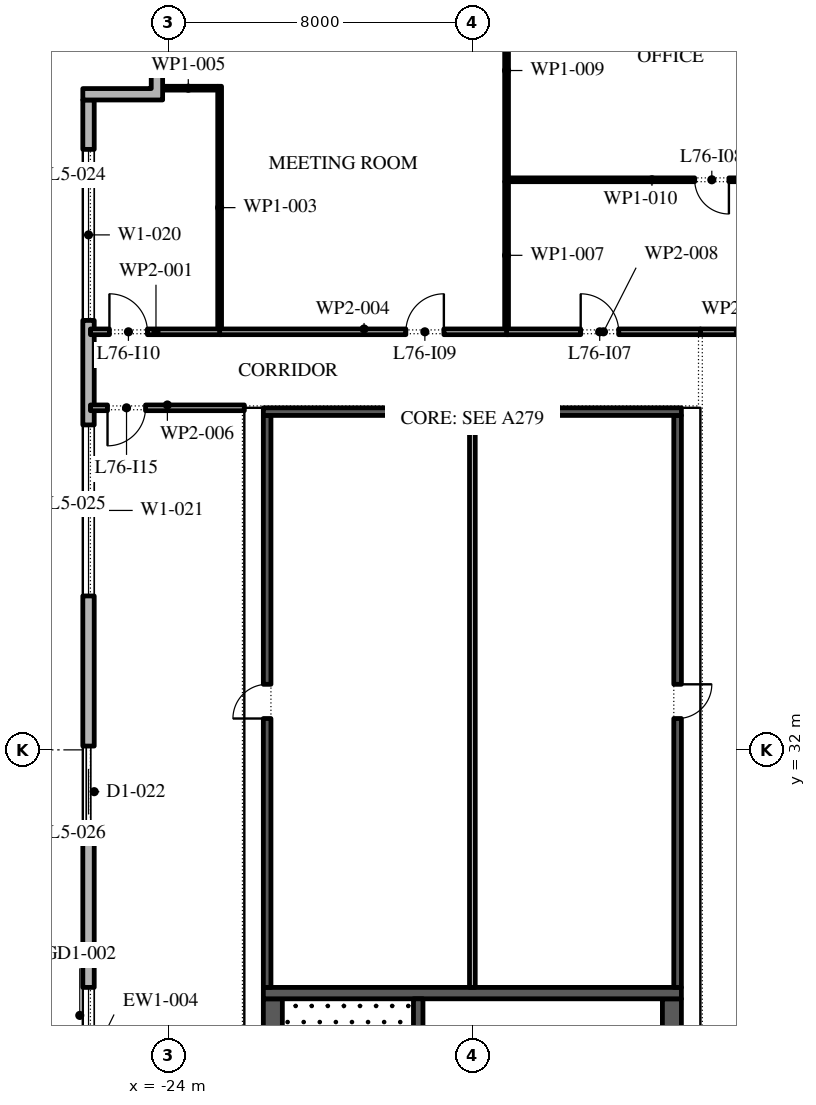
"""IFC4 building model, lengths in metres.
Left out: names, types, materials, properties, quantities, classifications, styles, units other than length and angle.
Written with IfcOpenShell. Run it as: python <this file> out.ifc"""

import sys

from ifc_helpers import new_model, si_unit, direction, frame, frame_2d, origin, place, context, subcontext, project, spatial, polyline, rectangle, outline, extrude, element, fill, save


model = new_model("IFC4")
c1 = context("Model", 3, precision=1e-05, world=origin(), true_north=direction((0.0, 1.0)))
c2 = subcontext(c1, "Body", "Model", "MODEL_VIEW")
j1 = project(units=[si_unit("LENGTHUNIT", "METRE"), si_unit("PLANEANGLEUNIT", "RADIAN")], contexts=[c1])
p1 = place(None, origin())
s1 = spatial("IfcSite", under=j1, at=p1, CompositionType="ELEMENT")
p2 = place(p1, origin())
s2 = spatial("IfcBuilding", under=s1, at=p2, CompositionType="ELEMENT")
p3 = place(p2, frame((0.0, 0.0, 346.8)))
s3 = spatial("IfcBuildingStorey", under=s2, at=p3, CompositionType="ELEMENT", Elevation=346.8)
p4 = place(p3, frame((-26.1, 49.1, 0.0), z_axis=(0.0, 0.0, 1.0), x_axis=(0.0, -1.0, 0.0)))
e1 = element("IfcWall", 1, at=p4, inside=s3, PredefinedType="STANDARD", context=c2, shape_type="SweptSolid", body=[
    extrude(rectangle(XDim=51.5, YDim=0.3, at=frame_2d((25.75, 0.0))), origin(), (0.0, 0.0, 1.0), 4.0),
])
p5 = place(p4, frame((1.3, 0.0, 0.45)))
e2 = element("IfcOpeningElement", 2, at=p5, cuts=e1, PredefinedType="OPENING", context=c2, shape_type="SweptSolid", body=[
    extrude(rectangle(XDim=4.5, YDim=3.05, at=frame_2d((2.25, 1.525))), frame((0.0, 0.16, 0.0), z_axis=(0.0, -1.0, 0.0), x_axis=(1.0, 0.0, 0.0)), (0.0, 0.0, 1.0), 0.32),
])
p6 = place(p4, frame((8.55, 0.0, 0.45)))
e3 = element("IfcOpeningElement", 3, at=p6, cuts=e1, PredefinedType="OPENING", context=c2, shape_type="SweptSolid", body=[
    extrude(rectangle(XDim=4.5, YDim=3.05, at=frame_2d((2.25, 1.525))), frame((0.0, 0.16, 0.0), z_axis=(0.0, -1.0, 0.0), x_axis=(1.0, 0.0, 0.0)), (0.0, 0.0, 1.0), 0.32),
])
p7 = place(p4, frame((17.0, 0.0, 0.0)))
e4 = element("IfcOpeningElement", 4, at=p7, cuts=e1, PredefinedType="OPENING", context=c2, shape_type="SweptSolid", body=[
    extrude(rectangle(XDim=2.4, YDim=3.5, at=frame_2d((1.2, 1.75))), frame((0.0, 0.16, 0.0), z_axis=(0.0, -1.0, 0.0), x_axis=(1.0, 0.0, 0.0)), (0.0, 0.0, 1.0), 0.32),
])
p8 = place(p4, frame((23.35, 0.0, 0.45)))
e5 = element("IfcOpeningElement", 5, at=p8, cuts=e1, PredefinedType="OPENING", context=c2, shape_type="SweptSolid", body=[
    extrude(rectangle(XDim=4.5, YDim=3.05, at=frame_2d((2.25, 1.525))), frame((0.0, 0.16, 0.0), z_axis=(0.0, -1.0, 0.0), x_axis=(1.0, 0.0, 0.0)), (0.0, 0.0, 1.0), 0.32),
])
p9 = place(p4, frame((30.75, 0.0, 0.45)))
e6 = element("IfcOpeningElement", 6, at=p9, cuts=e1, PredefinedType="OPENING", context=c2, shape_type="SweptSolid", body=[
    extrude(rectangle(XDim=4.5, YDim=3.05, at=frame_2d((2.25, 1.525))), frame((0.0, 0.16, 0.0), z_axis=(0.0, -1.0, 0.0), x_axis=(1.0, 0.0, 0.0)), (0.0, 0.0, 1.0), 0.32),
])
p10 = place(p4, frame((38.15, 0.0, 0.45)))
e7 = element("IfcOpeningElement", 7, at=p10, cuts=e1, PredefinedType="OPENING", context=c2, shape_type="SweptSolid", body=[
    extrude(rectangle(XDim=4.5, YDim=3.05, at=frame_2d((2.25, 1.525))), frame((0.0, 0.16, 0.0), z_axis=(0.0, -1.0, 0.0), x_axis=(1.0, 0.0, 0.0)), (0.0, 0.0, 1.0), 0.32),
])
p11 = place(p4, frame((46.6, 0.0, 0.0)))
e8 = element("IfcOpeningElement", 8, at=p11, cuts=e1, PredefinedType="OPENING", context=c2, shape_type="SweptSolid", body=[
    extrude(rectangle(XDim=2.4, YDim=3.5, at=frame_2d((1.2, 1.75))), frame((0.0, 0.16, 0.0), z_axis=(0.0, -1.0, 0.0), x_axis=(1.0, 0.0, 0.0)), (0.0, 0.0, 1.0), 0.32),
])
p12 = place(p3, origin())
e9 = element("IfcWall", 9, at=p12, inside=s3, PredefinedType="STANDARD", context=c2, shape_type="SweptSolid", body=[
    extrude(outline(polyline([(-24.45, 49.4), (-24.45, 51.2), (-22.65, 51.2), (-22.65, 52.7), (-22.35, 52.7), (-22.35, 50.9), (-24.15, 50.9), (-24.15, 49.1), (-26.25, 49.1), (-26.25, 49.4), (-24.45, 49.4)])), origin(), (0.0, 0.0, 1.0), 4.0),
])
p13 = place(p3, frame((-21.25, -2.45, 0.0), z_axis=(0.0, 0.0, 1.0), x_axis=(0.0, 1.0, 0.0)))
e10 = element("IfcWall", 10, at=p13, inside=s3, PredefinedType="SHEAR", context=c2, shape_type="SweptSolid", body=[
    extrude(rectangle(XDim=27.9, YDim=0.5, at=frame_2d((13.95, 0.0))), origin(), (0.0, 0.0, 1.0), 4.0),
])
p14 = place(p13, frame((5.05, 0.0, 0.0)))
e11 = element("IfcOpeningElement", 11, at=p14, cuts=e10, PredefinedType="OPENING", context=c2, shape_type="SweptSolid", body=[
    extrude(rectangle(XDim=1.2, YDim=2.1, at=frame_2d((0.6, 1.05))), frame((0.0, 0.26, 0.0), z_axis=(0.0, -1.0, 0.0), x_axis=(1.0, 0.0, 0.0)), (0.0, 0.0, 1.0), 0.52),
])
p15 = place(p13, frame((21.65, 0.0, 0.0)))
e12 = element("IfcOpeningElement", 12, at=p15, cuts=e10, PredefinedType="OPENING", context=c2, shape_type="SweptSolid", body=[
    extrude(rectangle(XDim=1.2, YDim=2.1, at=frame_2d((0.6, 1.05))), frame((0.0, 0.26, 0.0), z_axis=(0.0, -1.0, 0.0), x_axis=(1.0, 0.0, 0.0)), (0.0, 0.0, 1.0), 0.52),
])
p16 = place(p3, frame((-10.75, -2.45, 0.0), z_axis=(0.0, 0.0, 1.0), x_axis=(0.0, 1.0, 0.0)))
e13 = element("IfcWall", 13, at=p16, inside=s3, PredefinedType="SHEAR", context=c2, shape_type="SweptSolid", body=[
    extrude(rectangle(XDim=27.9, YDim=0.5, at=frame_2d((13.95, 0.0))), origin(), (0.0, 0.0, 1.0), 4.0),
])
p17 = place(p16, frame((23.65, 0.0, 0.0)))
e14 = element("IfcOpeningElement", 14, at=p17, cuts=e13, PredefinedType="OPENING", context=c2, shape_type="SweptSolid", body=[
    extrude(rectangle(XDim=2.4, YDim=2.1, at=frame_2d((1.2, 1.05))), frame((0.0, 0.26, 0.0), z_axis=(0.0, -1.0, 0.0), x_axis=(1.0, 0.0, 0.0)), (0.0, 0.0, 1.0), 0.52),
])
p18 = place(p16, frame((1.387, 0.0, 0.0)))
e15 = element("IfcOpeningElement", 15, at=p18, cuts=e13, PredefinedType="OPENING", context=c2, shape_type="SweptSolid", body=[
    extrude(rectangle(XDim=0.9, YDim=2.1, at=frame_2d((0.45, 1.05))), frame((0.0, 0.26, 0.0), z_axis=(0.0, -1.0, 0.0), x_axis=(1.0, 0.0, 0.0)), (0.0, 0.0, 1.0), 0.52),
])
p19 = place(p16, frame((4.562, 0.0, 0.0)))
e16 = element("IfcOpeningElement", 16, at=p19, cuts=e13, PredefinedType="OPENING", context=c2, shape_type="SweptSolid", body=[
    extrude(rectangle(XDim=1.0, YDim=2.1, at=frame_2d((0.5, 1.05))), frame((0.0, 0.26, 0.0), z_axis=(0.0, -1.0, 0.0), x_axis=(1.0, 0.0, 0.0)), (0.0, 0.0, 1.0), 0.52),
])
p20 = place(p3, frame((-21.5, 25.6, 0.0), z_axis=(0.0, 0.0, 1.0), x_axis=(1.0, 0.0, 0.0)))
e17 = element("IfcWall", 17, at=p20, inside=s3, PredefinedType="SHEAR", context=c2, shape_type="SweptSolid", body=[
    extrude(rectangle(XDim=11.0, YDim=0.3, at=frame_2d((5.5, 0.0))), origin(), (0.0, 0.0, 1.0), 4.0),
])
p21 = place(p3, frame((-17.425, 19.15, 0.0), z_axis=(0.0, 0.0, 1.0), x_axis=(0.0, 1.0, 0.0)))
e18 = element("IfcWall", 18, at=p21, inside=s3, PredefinedType="SHEAR", context=c2, shape_type="SweptSolid", body=[
    extrude(rectangle(XDim=6.3, YDim=0.25, at=frame_2d((3.15, 0.0))), origin(), (0.0, 0.0, 1.0), 4.0),
])
p22 = place(p21, frame((0.05, 0.0, 0.0)))
e19 = element("IfcOpeningElement", 19, at=p22, cuts=e18, PredefinedType="OPENING", context=c2, shape_type="SweptSolid", body=[
    extrude(rectangle(XDim=1.2, YDim=2.1, at=frame_2d((0.6, 1.05))), frame((0.0, 0.135, 0.0), z_axis=(0.0, -1.0, 0.0), x_axis=(1.0, 0.0, 0.0)), (0.0, 0.0, 1.0), 0.27),
])
p23 = place(p3, frame((-21.4, 25.75, 0.0), z_axis=(0.0, 0.0, 1.0), x_axis=(0.0, 1.0, 0.0)))
e20 = element("IfcWall", 20, at=p23, inside=s3, PredefinedType="SHEAR", context=c2, shape_type="SweptSolid", body=[
    extrude(rectangle(XDim=15.05, YDim=0.2, at=frame_2d((7.525, 0.0))), origin(), (0.0, 0.0, 1.0), 4.0),
])
p24 = place(p23, frame((7.075, 0.0, 0.0)))
e21 = element("IfcOpeningElement", 21, at=p24, cuts=e20, PredefinedType="OPENING", context=c2, shape_type="SweptSolid", body=[
    extrude(rectangle(XDim=0.9, YDim=2.1, at=frame_2d((0.45, 1.05))), frame((0.0, 0.11, 0.0), z_axis=(0.0, -1.0, 0.0), x_axis=(1.0, 0.0, 0.0)), (0.0, 0.0, 1.0), 0.22),
])
p25 = place(p3, frame((-10.6, 25.75, 0.0), z_axis=(0.0, 0.0, 1.0), x_axis=(0.0, 1.0, 0.0)))
e22 = element("IfcWall", 22, at=p25, inside=s3, PredefinedType="SHEAR", context=c2, shape_type="SweptSolid", body=[
    extrude(rectangle(XDim=15.05, YDim=0.2, at=frame_2d((7.525, 0.0))), origin(), (0.0, 0.0, 1.0), 4.0),
])
p26 = place(p25, frame((7.075, 0.0, 0.0)))
e23 = element("IfcOpeningElement", 23, at=p26, cuts=e22, PredefinedType="OPENING", context=c2, shape_type="SweptSolid", body=[
    extrude(rectangle(XDim=0.9, YDim=2.1, at=frame_2d((0.45, 1.05))), frame((0.0, 0.11, 0.0), z_axis=(0.0, -1.0, 0.0), x_axis=(1.0, 0.0, 0.0)), (0.0, 0.0, 1.0), 0.22),
])
p27 = place(p3, frame((-21.5, 40.9, 0.0), z_axis=(0.0, 0.0, 1.0), x_axis=(1.0, 0.0, 0.0)))
e24 = element("IfcWall", 24, at=p27, inside=s3, PredefinedType="SHEAR", context=c2, shape_type="SweptSolid", body=[
    extrude(rectangle(XDim=11.0, YDim=0.2, at=frame_2d((5.5, 0.0))), origin(), (0.0, 0.0, 1.0), 4.0),
])
p28 = place(p3, frame((-16.0, 25.75, 0.0), z_axis=(0.0, 0.0, 1.0), x_axis=(0.0, 1.0, 0.0)))
e25 = element("IfcWall", 25, at=p28, inside=s3, PredefinedType="PARTITIONING", context=c2, shape_type="SweptSolid", body=[
    extrude(rectangle(XDim=15.05, YDim=0.15, at=frame_2d((7.525, 0.0))), origin(), (0.0, 0.0, 1.0), 4.0),
])
p29 = place(p3, frame((-26.05, 43.0, 0.0), z_axis=(0.0, 0.0, 1.0), x_axis=(1.0, 0.0, 0.0)))
e26 = element("IfcWall", 26, at=p29, inside=s3, PredefinedType="PARTITIONING", context=c2, shape_type="SweptSolid", body=[
    extrude(rectangle(XDim=3.45, YDim=0.15, at=frame_2d((1.725, 0.0))), origin(), (0.0, 0.0, 1.0), 4.0),
])
p30 = place(p29, frame((0.5, 0.0, 0.0)))
e27 = element("IfcOpeningElement", 27, at=p30, cuts=e26, PredefinedType="OPENING", context=c2, shape_type="SweptSolid", body=[
    extrude(rectangle(XDim=1.0, YDim=2.1, at=frame_2d((0.5, 1.05))), frame((0.0, 0.085, 0.0), z_axis=(0.0, -1.0, 0.0), x_axis=(1.0, 0.0, 0.0)), (0.0, 0.0, 1.0), 0.17),
])
p31 = place(p3, frame((-22.65, 43.075, 0.0), z_axis=(0.0, 0.0, 1.0), x_axis=(0.0, 1.0, 0.0)))
e28 = element("IfcWall", 28, at=p31, inside=s3, PredefinedType="PARTITIONING", context=c2, shape_type="SweptSolid", body=[
    extrude(rectangle(XDim=6.385, YDim=0.1, at=frame_2d((3.192, 0.0))), origin(), (0.0, 0.0, 1.0), 4.0),
])
p32 = place(p3, frame((-22.65, 43.0, 0.0), z_axis=(0.0, 0.0, 1.0), x_axis=(1.0, 0.0, 0.0)))
e29 = element("IfcWall", 29, at=p32, inside=s3, PredefinedType="PARTITIONING", context=c2, shape_type="SweptSolid", body=[
    extrude(rectangle(XDim=7.6, YDim=0.15, at=frame_2d((3.8, 0.0))), origin(), (0.0, 0.0, 1.0), 4.0),
])
p33 = place(p32, frame((4.9, 0.0, 0.0)))
e30 = element("IfcOpeningElement", 30, at=p33, cuts=e29, PredefinedType="OPENING", context=c2, shape_type="SweptSolid", body=[
    extrude(rectangle(XDim=1.0, YDim=2.1, at=frame_2d((0.5, 1.05))), frame((0.0, 0.085, 0.0), z_axis=(0.0, -1.0, 0.0), x_axis=(1.0, 0.0, 0.0)), (0.0, 0.0, 1.0), 0.17),
])
p34 = place(p3, frame((-22.7, 49.41, 0.0), z_axis=(0.0, 0.0, 1.0), x_axis=(-1.0, 0.0, 0.0)))
e31 = element("IfcWall", 31, at=p34, inside=s3, PredefinedType="PARTITIONING", context=c2, shape_type="SweptSolid", body=[
    extrude(rectangle(XDim=1.55, YDim=0.1, at=frame_2d((0.775, 0.0))), origin(), (0.0, 0.0, 1.0), 4.0),
])
p35 = place(p3, frame((-22.0, 41.0, 0.0), z_axis=(0.0, 0.0, 1.0), x_axis=(-1.0, 0.0, 0.0)))
e32 = element("IfcWall", 32, at=p35, inside=s3, PredefinedType="PARTITIONING", context=c2, shape_type="SweptSolid", body=[
    extrude(rectangle(XDim=4.05, YDim=0.15, at=frame_2d((2.025, 0.0))), origin(), (0.0, 0.0, 1.0), 4.0),
])
p36 = place(p35, frame((2.6, 0.0, 0.0)))
e33 = element("IfcOpeningElement", 33, at=p36, cuts=e32, PredefinedType="OPENING", context=c2, shape_type="SweptSolid", body=[
    extrude(rectangle(XDim=1.0, YDim=2.1, at=frame_2d((0.5, 1.05))), frame((0.0, 0.085, 0.0), z_axis=(0.0, -1.0, 0.0), x_axis=(1.0, 0.0, 0.0)), (0.0, 0.0, 1.0), 0.17),
])
p37 = place(p3, frame((-15.1, 43.075, 0.0), z_axis=(0.0, 0.0, 1.0), x_axis=(0.0, 1.0, 0.0)))
e34 = element("IfcWall", 34, at=p37, inside=s3, PredefinedType="PARTITIONING", context=c2, shape_type="SweptSolid", body=[
    extrude(rectangle(XDim=3.875, YDim=0.1, at=frame_2d((1.938, 0.0))), origin(), (0.0, 0.0, 1.0), 4.0),
])
p38 = place(p3, frame((-15.1, 43.0, 0.0), z_axis=(0.0, 0.0, 1.0), x_axis=(1.0, 0.0, 0.0)))
e35 = element("IfcWall", 35, at=p38, inside=s3, PredefinedType="PARTITIONING", context=c2, shape_type="SweptSolid", body=[
    extrude(rectangle(XDim=5.1, YDim=0.15, at=frame_2d((2.55, 0.0))), origin(), (0.0, 0.0, 1.0), 4.0),
])
p39 = place(p38, frame((1.95, 0.0, 0.0)))
e36 = element("IfcOpeningElement", 36, at=p39, cuts=e35, PredefinedType="OPENING", context=c2, shape_type="SweptSolid", body=[
    extrude(rectangle(XDim=1.0, YDim=2.1, at=frame_2d((0.5, 1.05))), frame((0.0, 0.085, 0.0), z_axis=(0.0, -1.0, 0.0), x_axis=(1.0, 0.0, 0.0)), (0.0, 0.0, 1.0), 0.17),
])
p40 = place(p3, frame((-15.1, 46.95, 0.0), z_axis=(0.0, 0.0, 1.0), x_axis=(0.0, 1.0, 0.0)))
e37 = element("IfcWall", 37, at=p40, inside=s3, PredefinedType="PARTITIONING", context=c2, shape_type="SweptSolid", body=[
    extrude(rectangle(XDim=5.85, YDim=0.1, at=frame_2d((2.925, 0.0))), origin(), (0.0, 0.0, 1.0), 4.0),
])
p41 = place(p3, frame((-15.05, 47.0, 0.0), z_axis=(0.0, 0.0, 1.0), x_axis=(1.0, 0.0, 0.0)))
e38 = element("IfcWall", 38, at=p41, inside=s3, PredefinedType="PARTITIONING", context=c2, shape_type="SweptSolid", body=[
    extrude(rectangle(XDim=7.55, YDim=0.1, at=frame_2d((3.775, 0.0))), origin(), (0.0, 0.0, 1.0), 4.0),
])
p42 = place(p41, frame((4.9, 0.0, 0.0)))
e39 = element("IfcOpeningElement", 39, at=p42, cuts=e38, PredefinedType="OPENING", context=c2, shape_type="SweptSolid", body=[
    extrude(rectangle(XDim=0.9, YDim=2.1, at=frame_2d((0.45, 1.05))), frame((0.0, 0.06, 0.0), z_axis=(0.0, -1.0, 0.0), x_axis=(1.0, 0.0, 0.0)), (0.0, 0.0, 1.0), 0.12),
])
p43 = place(p3, frame((-10.0, 43.0, 0.0), z_axis=(0.0, 0.0, 1.0), x_axis=(1.0, 0.0, 0.0)))
e40 = element("IfcWall", 40, at=p43, inside=s3, PredefinedType="PARTITIONING", context=c2, shape_type="SweptSolid", body=[
    extrude(rectangle(XDim=2.0, YDim=0.15, at=frame_2d((1.0, 0.0))), origin(), (0.0, 0.0, 1.0), 4.0),
])
p44 = place(p5, origin())
e41 = element("IfcWindow", 41, at=p44, inside=s3, PartitioningType="DOUBLE_PANEL_VERTICAL", PredefinedType="WINDOW", context=c2, shape_type="SweptSolid", body=[
    extrude(rectangle(XDim=4.5, YDim=3.05, at=frame_2d((2.25, 1.525))), frame((0.0, 0.03, 0.0), z_axis=(0.0, -1.0, 0.0), x_axis=(1.0, 0.0, 0.0)), (0.0, 0.0, 1.0), 0.06),
])
fill(e2, e41)
p45 = place(p6, origin())
e42 = element("IfcWindow", 42, at=p45, inside=s3, PartitioningType="DOUBLE_PANEL_VERTICAL", PredefinedType="WINDOW", context=c2, shape_type="SweptSolid", body=[
    extrude(rectangle(XDim=4.5, YDim=3.05, at=frame_2d((2.25, 1.525))), frame((0.0, 0.03, 0.0), z_axis=(0.0, -1.0, 0.0), x_axis=(1.0, 0.0, 0.0)), (0.0, 0.0, 1.0), 0.06),
])
fill(e3, e42)
p46 = place(p7, origin())
e43 = element("IfcDoor", 43, at=p46, inside=s3, OperationType="DOUBLE_DOOR_SLIDING", PredefinedType="DOOR", context=c2, shape_type="SweptSolid", body=[
    extrude(rectangle(XDim=2.4, YDim=3.5, at=frame_2d((1.2, 1.75))), frame((0.0, 0.025, 0.0), z_axis=(0.0, -1.0, 0.0), x_axis=(1.0, 0.0, 0.0)), (0.0, 0.0, 1.0), 0.05),
])
fill(e4, e43)
p47 = place(p8, origin())
e44 = element("IfcWindow", 44, at=p47, inside=s3, PartitioningType="DOUBLE_PANEL_VERTICAL", PredefinedType="WINDOW", context=c2, shape_type="SweptSolid", body=[
    extrude(rectangle(XDim=4.5, YDim=3.05, at=frame_2d((2.25, 1.525))), frame((0.0, 0.03, 0.0), z_axis=(0.0, -1.0, 0.0), x_axis=(1.0, 0.0, 0.0)), (0.0, 0.0, 1.0), 0.06),
])
fill(e5, e44)
p48 = place(p24, origin())
e45 = element("IfcDoor", 45, at=p48, inside=s3, OperationType="SINGLE_SWING_RIGHT", PredefinedType="DOOR", context=c2, shape_type="SweptSolid", body=[
    extrude(rectangle(XDim=0.9, YDim=2.1, at=frame_2d((0.45, 1.05))), frame((0.0, -0.05, 0.0), z_axis=(0.0, -1.0, 0.0), x_axis=(1.0, 0.0, 0.0)), (0.0, 0.0, 1.0), 0.05),
])
fill(e21, e45)
p49 = place(p26, frame((0.9, 0.15, 0.0), z_axis=(0.0, 0.0, 1.0), x_axis=(-1.0, 0.0, 0.0)))
e46 = element("IfcDoor", 46, at=p49, inside=s3, OperationType="SINGLE_SWING_RIGHT", PredefinedType="DOOR", context=c2, shape_type="SweptSolid", body=[
    extrude(rectangle(XDim=0.9, YDim=2.1, at=frame_2d((0.45, 1.05))), frame((0.0, 0.1, 0.0), z_axis=(0.0, -1.0, 0.0), x_axis=(1.0, 0.0, 0.0)), (0.0, 0.0, 1.0), 0.05),
])
fill(e23, e46)
p50 = place(p39, origin())
e47 = element("IfcDoor", 47, at=p50, inside=s3, OperationType="SINGLE_SWING_RIGHT", PredefinedType="DOOR", context=c2, shape_type="SweptSolid", body=[
    extrude(rectangle(XDim=1.0, YDim=2.1, at=frame_2d((0.5, 1.05))), frame((0.0, 0.025, 0.0), z_axis=(0.0, -1.0, 0.0), x_axis=(1.0, 0.0, 0.0)), (0.0, 0.0, 1.0), 0.05),
])
fill(e36, e47)
p51 = place(p42, frame((0.9, 0.0, 0.0), z_axis=(0.0, 0.0, 1.0), x_axis=(-1.0, 0.0, 0.0)))
e48 = element("IfcDoor", 48, at=p51, inside=s3, OperationType="SINGLE_SWING_RIGHT", PredefinedType="DOOR", context=c2, shape_type="SweptSolid", body=[
    extrude(rectangle(XDim=0.9, YDim=2.1, at=frame_2d((0.45, 1.05))), frame((0.0, 0.025, 0.0), z_axis=(0.0, -1.0, 0.0), x_axis=(1.0, 0.0, 0.0)), (0.0, 0.0, 1.0), 0.05),
])
fill(e39, e48)
p52 = place(p33, origin())
e49 = element("IfcDoor", 49, at=p52, inside=s3, OperationType="SINGLE_SWING_LEFT", PredefinedType="DOOR", context=c2, shape_type="SweptSolid", body=[
    extrude(rectangle(XDim=1.0, YDim=2.1, at=frame_2d((0.5, 1.05))), frame((0.0, 0.025, 0.0), z_axis=(0.0, -1.0, 0.0), x_axis=(1.0, 0.0, 0.0)), (0.0, 0.0, 1.0), 0.05),
])
fill(e30, e49)
p53 = place(p30, origin())
e50 = element("IfcDoor", 50, at=p53, inside=s3, OperationType="SINGLE_SWING_RIGHT", PredefinedType="DOOR", context=c2, shape_type="SweptSolid", body=[
    extrude(rectangle(XDim=1.0, YDim=2.1, at=frame_2d((0.5, 1.05))), frame((0.0, 0.025, 0.0), z_axis=(0.0, -1.0, 0.0), x_axis=(1.0, 0.0, 0.0)), (0.0, 0.0, 1.0), 0.05),
])
fill(e27, e50)
p54 = place(p36, origin())
e51 = element("IfcDoor", 51, at=p54, inside=s3, OperationType="SINGLE_SWING_LEFT", PredefinedType="DOOR", context=c2, shape_type="SweptSolid", body=[
    extrude(rectangle(XDim=1.0, YDim=2.1, at=frame_2d((0.5, 1.05))), frame((0.0, 0.025, 0.0), z_axis=(0.0, -1.0, 0.0), x_axis=(1.0, 0.0, 0.0)), (0.0, 0.0, 1.0), 0.05),
])
fill(e33, e51)
save(model, sys.argv[1])
